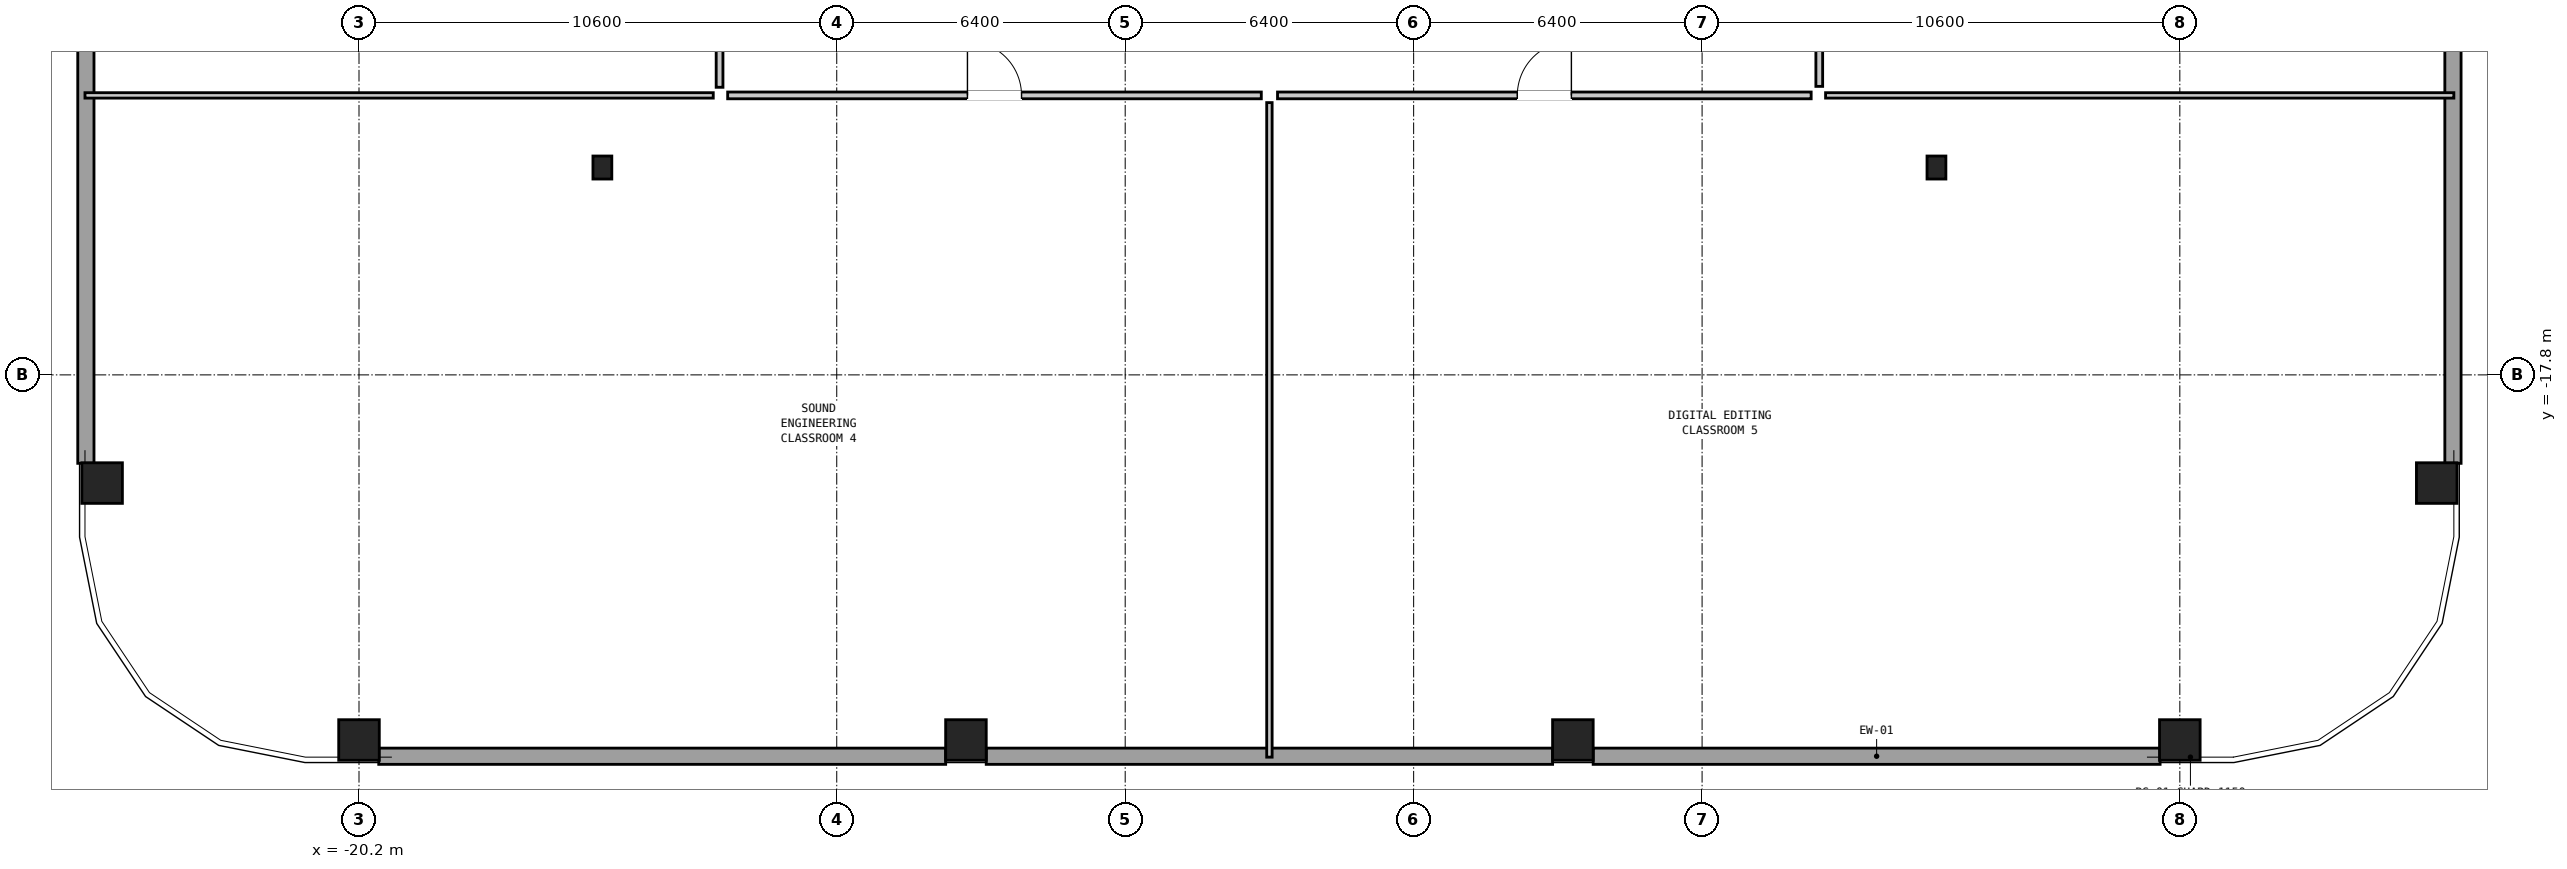
"""IFC4 building model, lengths in metres.
Left out: names, types, materials, properties, quantities, classifications, styles, units other than length and angle.
Written with IfcOpenShell. Run it as: python <this file> out.ifc"""

import sys

from ifc_helpers import new_model, si_unit, direction, frame, frame_2d, origin, origin_2d, place, context, subcontext, project, spatial, rectangle, hollow_rectangle, i_section, extrude, element, fill, save


model = new_model("IFC4")
c1 = context("Model", 3, precision=1e-05, world=origin(), true_north=direction((0.0, 1.0)))
c2 = subcontext(c1, "Body", "Model", "MODEL_VIEW")
j1 = project(units=[si_unit("LENGTHUNIT", "METRE"), si_unit("PLANEANGLEUNIT", "RADIAN")], contexts=[c1])
p1 = place(None, origin())
s1 = spatial("IfcSite", under=j1, at=p1, CompositionType="ELEMENT")
p2 = place(p1, origin())
s2 = spatial("IfcBuilding", under=s1, at=p2, CompositionType="ELEMENT")
p3 = place(p2, frame((0.0, 0.0, 50.5)))
s3 = spatial("IfcBuildingStorey", under=s2, at=p3, CompositionType="ELEMENT", Elevation=50.5)
for number, where, z_axis, x_axis in (
    (1, (-20.2, -25.9, 0.0), (0.0, 0.0, 1.0), (1.0, 0.0, 0.0)),
    (2, (-6.733, -25.9, 0.0), (0.0, 0.0, 1.0), (1.0, 0.0, 0.0)),
    (3, (6.733, -25.9, 0.0), (0.0, 0.0, 1.0), (1.0, 0.0, 0.0)),
    (4, (20.2, -25.9, 0.0), (0.0, 0.0, 1.0), (1.0, 0.0, 0.0)),
    (5, (25.9, -20.2, 0.0), (0.0, 0.0, 1.0), (0.0, 1.0, 0.0)),
    (6, (-25.9, -20.2, 0.0), (0.0, 0.0, 1.0), (0.0, 1.0, 0.0)),
):
    element("IfcColumn", number, at=place(p3, frame(where, z_axis=z_axis, x_axis=x_axis)), inside=s3, PredefinedType="COLUMN", context=c2, shape_type="SweptSolid", body=[
        extrude(hollow_rectangle(XDim=0.9, YDim=0.9, WallThickness=0.055, at=origin_2d()), origin(), (0.0, 0.0, 1.0), 3.05),
    ])
for number, where, z_axis, x_axis in (
    (7, (-14.8, -13.2, 0.0), (0.0, 0.0, 1.0), (1.0, 0.0, 0.0)),
    (8, (14.8, -13.2, 0.0), (0.0, 0.0, 1.0), (1.0, 0.0, 0.0)),
):
    element("IfcColumn", number, at=place(p3, frame(where, z_axis=z_axis, x_axis=x_axis)), inside=s3, PredefinedType="COLUMN", context=c2, shape_type="SweptSolid", body=[
        extrude(i_section(OverallWidth=0.418, OverallDepth=0.51, WebThickness=0.042, FlangeThickness=0.068, at=origin_2d()), origin(), (0.0, 0.0, 1.0), 3.05),
    ])
p4 = place(p3, frame((19.762, -26.26, 0.0), z_axis=(0.0, 0.0, 1.0), x_axis=(-1.0, 0.0, 0.0)))
e9 = element("IfcWall", 9, at=p4, inside=s3, PredefinedType="SOLIDWALL", context=c2, shape_type="SweptSolid", body=[
    extrude(rectangle(XDim=12.579, YDim=0.36, at=frame_2d((6.289, 0.0))), origin(), (0.0, 0.0, 1.0), 0.95),
])
p5 = place(p3, frame((6.283, -26.26, 0.0), z_axis=(0.0, 0.0, 1.0), x_axis=(-1.0, 0.0, 0.0)))
e10 = element("IfcWall", 10, at=p5, inside=s3, PredefinedType="SOLIDWALL", context=c2, shape_type="SweptSolid", body=[
    extrude(rectangle(XDim=12.566, YDim=0.36, at=frame_2d((6.283, 0.0))), origin(), (0.0, 0.0, 1.0), 0.95),
])
for number, where, z_axis, x_axis in (
    (11, (-7.183, -26.26, 0.0), (0.0, 0.0, 1.0), (-1.0, 0.0, 0.0)),
    (12, (26.26, -7.183, 0.0), (0.0, 0.0, 1.0), (0.0, -1.0, 0.0)),
    (13, (-26.26, -19.762, 0.0), (0.0, 0.0, 1.0), (0.0, 1.0, 0.0)),
):
    element("IfcWall", number, at=place(p3, frame(where, z_axis=z_axis, x_axis=x_axis)), inside=s3, PredefinedType="SOLIDWALL", context=c2, shape_type="SweptSolid", body=[
        extrude(rectangle(XDim=12.579, YDim=0.36, at=frame_2d((6.289, 0.0))), origin(), (0.0, 0.0, 1.0), 0.95),
    ])
for number, where, z_axis, x_axis in (
    (14, (-26.28, -11.6, 0.0), (0.0, 0.0, 1.0), (1.0, 0.0, 0.0)),
    (15, (12.34, -11.6, 0.0), (0.0, 0.0, 1.0), (1.0, 0.0, 0.0)),
):
    element("IfcWall", number, at=place(p3, frame(where, z_axis=z_axis, x_axis=x_axis)), inside=s3, PredefinedType="PARTITIONING", context=c2, shape_type="SweptSolid", body=[
        extrude(rectangle(XDim=13.94, YDim=0.12, at=frame_2d((6.97, 0.0))), origin(), (0.0, 0.0, 1.0), 2.274),
    ])
p6 = place(p3, frame((0.0, -26.28, 0.0), z_axis=(0.0, 0.0, 1.0), x_axis=(0.0, 1.0, 0.0)))
e16 = element("IfcWall", 16, at=p6, inside=s3, PredefinedType="PARTITIONING", context=c2, shape_type="SweptSolid", body=[
    extrude(rectangle(XDim=14.52, YDim=0.12, at=frame_2d((7.26, 0.0))), origin(), (0.0, 0.0, 1.0), 2.274),
])
p7 = place(p3, frame((-12.02, -11.6, 0.0), z_axis=(0.0, 0.0, 1.0), x_axis=(1.0, 0.0, 0.0)))
e17 = element("IfcWall", 17, at=p7, inside=s3, PredefinedType="PARTITIONING", context=c2, shape_type="SweptSolid", body=[
    extrude(rectangle(XDim=11.84, YDim=0.15, at=frame_2d((5.92, 0.0))), origin(), (0.0, 0.0, 1.0), 2.274),
])
p8 = place(p7, frame((5.32, 0.0, 0.0)))
e18 = element("IfcOpeningElement", 18, at=p8, cuts=e17, PredefinedType="OPENING", context=c2, shape_type="SweptSolid", body=[
    extrude(rectangle(XDim=1.2, YDim=2.1, at=frame_2d((0.6, 1.05))), frame((0.0, 0.087, 0.0), z_axis=(0.0, -1.0, 0.0), x_axis=(1.0, 0.0, 0.0)), (0.0, 0.0, 1.0), 0.174),
])
p9 = place(p3, frame((0.18, -11.6, 0.0), z_axis=(0.0, 0.0, 1.0), x_axis=(1.0, 0.0, 0.0)))
e19 = element("IfcWall", 19, at=p9, inside=s3, PredefinedType="PARTITIONING", context=c2, shape_type="SweptSolid", body=[
    extrude(rectangle(XDim=11.84, YDim=0.15, at=frame_2d((5.92, 0.0))), origin(), (0.0, 0.0, 1.0), 2.274),
])
p10 = place(p9, frame((5.32, 0.0, 0.0)))
e20 = element("IfcOpeningElement", 20, at=p10, cuts=e19, PredefinedType="OPENING", context=c2, shape_type="SweptSolid", body=[
    extrude(rectangle(XDim=1.2, YDim=2.1, at=frame_2d((0.6, 1.05))), frame((0.0, 0.087, 0.0), z_axis=(0.0, -1.0, 0.0), x_axis=(1.0, 0.0, 0.0)), (0.0, 0.0, 1.0), 0.174),
])
p11 = place(p3, frame((-12.2, -11.42, 0.0), z_axis=(0.0, 0.0, 1.0), x_axis=(0.0, 1.0, 0.0)))
e21 = element("IfcWall", 21, at=p11, inside=s3, PredefinedType="PARTITIONING", context=c2, shape_type="SweptSolid", body=[
    extrude(rectangle(XDim=11.24, YDim=0.15, at=frame_2d((5.62, 0.0))), origin(), (0.0, 0.0, 1.0), 2.83),
])
p12 = place(p11, frame((5.02, 0.0, 0.0)))
e22 = element("IfcOpeningElement", 22, at=p12, cuts=e21, PredefinedType="OPENING", context=c2, shape_type="SweptSolid", body=[
    extrude(rectangle(XDim=1.2, YDim=2.1, at=frame_2d((0.6, 1.05))), frame((0.0, 0.087, 0.0), z_axis=(0.0, -1.0, 0.0), x_axis=(1.0, 0.0, 0.0)), (0.0, 0.0, 1.0), 0.174),
])
p13 = place(p3, frame((12.2, -11.4, 0.0), z_axis=(0.0, 0.0, 1.0), x_axis=(0.0, 1.0, 0.0)))
e23 = element("IfcWall", 23, at=p13, inside=s3, PredefinedType="PARTITIONING", context=c2, shape_type="SweptSolid", body=[
    extrude(rectangle(XDim=8.84, YDim=0.15, at=frame_2d((4.42, 0.0))), origin(), (0.0, 0.0, 1.0), 2.83),
])
p14 = place(p13, frame((3.945, 0.0, 0.0)))
e24 = element("IfcOpeningElement", 24, at=p14, cuts=e23, PredefinedType="OPENING", context=c2, shape_type="SweptSolid", body=[
    extrude(rectangle(XDim=0.95, YDim=2.1, at=frame_2d((0.475, 1.05))), frame((0.0, 0.087, 0.0), z_axis=(0.0, -1.0, 0.0), x_axis=(1.0, 0.0, 0.0)), (0.0, 0.0, 1.0), 0.174),
])
p15 = place(p8, origin())
e25 = element("IfcDoor", 25, at=p15, inside=s3, OperationType="SINGLE_SWING_LEFT", PredefinedType="DOOR", context=c2, shape_type="SweptSolid", body=[
    extrude(rectangle(XDim=1.2, YDim=2.1, at=frame_2d((0.6, 1.05))), frame((0.0, 0.025, 0.0), z_axis=(0.0, -1.0, 0.0), x_axis=(1.0, 0.0, 0.0)), (0.0, 0.0, 1.0), 0.05),
])
fill(e18, e25)
p16 = place(p10, origin())
e26 = element("IfcDoor", 26, at=p16, inside=s3, OperationType="SINGLE_SWING_RIGHT", PredefinedType="DOOR", context=c2, shape_type="SweptSolid", body=[
    extrude(rectangle(XDim=1.2, YDim=2.1, at=frame_2d((0.6, 1.05))), frame((0.0, 0.025, 0.0), z_axis=(0.0, -1.0, 0.0), x_axis=(1.0, 0.0, 0.0)), (0.0, 0.0, 1.0), 0.05),
])
fill(e20, e26)
save(model, sys.argv[1])
